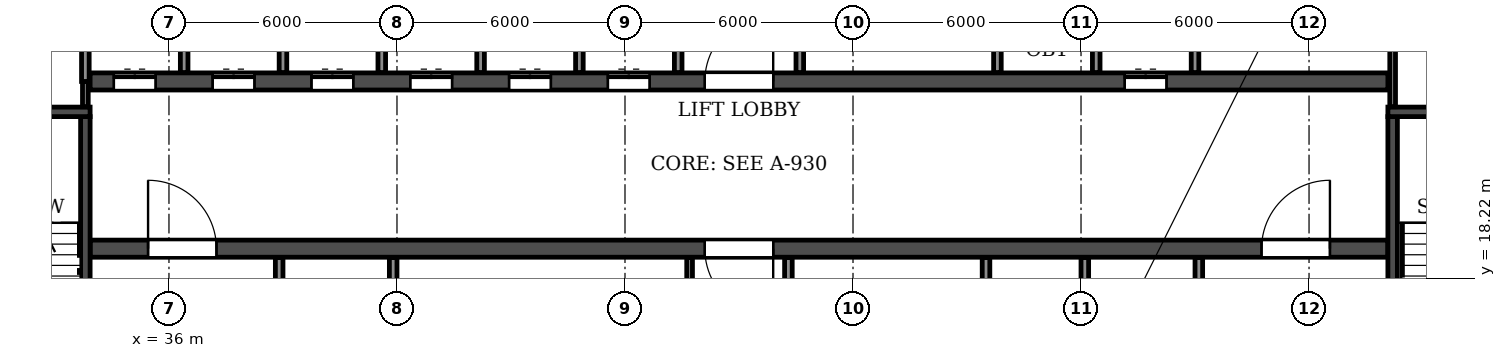
"""IFC4 building model, lengths in metres.
Left out: names, types, materials, properties, quantities, classifications, styles, units other than length and angle.
Written with IfcOpenShell. Run it as: python <this file> out.ifc"""

import sys

from ifc_helpers import new_model, si_unit, direction, frame, frame_2d, origin, place, context, subcontext, project, spatial, rectangle, extrude, element, fill, save


model = new_model("IFC4")
c1 = context("Model", 3, precision=1e-05, world=origin(), true_north=direction((0.0, 1.0)))
c2 = subcontext(c1, "Body", "Model", "MODEL_VIEW")
j1 = project(units=[si_unit("LENGTHUNIT", "METRE"), si_unit("PLANEANGLEUNIT", "RADIAN")], contexts=[c1])
p1 = place(None, origin())
s1 = spatial("IfcSite", under=j1, at=p1, CompositionType="ELEMENT")
p2 = place(p1, origin())
s2 = spatial("IfcBuilding", under=s1, at=p2, CompositionType="ELEMENT")
p3 = place(p2, frame((0.0, 0.0, 162.0)))
s3 = spatial("IfcBuildingStorey", under=s2, at=p3, CompositionType="ELEMENT", Elevation=162.0)
p4 = place(p3, frame((33.925, 19.0, 0.0), z_axis=(0.0, 0.0, 1.0), x_axis=(1.0, 0.0, 0.0)))
e1 = element("IfcWall", 1, at=p4, inside=s3, PredefinedType="SOLIDWALL", context=c2, shape_type="SweptSolid", body=[
    extrude(rectangle(XDim=34.15, YDim=0.45, at=frame_2d((17.075, 0.0))), origin(), (0.0, 0.0, 1.0), 2.95),
])
p5 = place(p4, frame((16.175, 0.0, 0.0)))
e2 = element("IfcOpeningElement", 2, at=p5, cuts=e1, PredefinedType="OPENING", context=c2, shape_type="SweptSolid", body=[
    extrude(rectangle(XDim=1.8, YDim=2.1, at=frame_2d((0.9, 1.05))), frame((0.0, 0.235, 0.0), z_axis=(0.0, -1.0, 0.0), x_axis=(1.0, 0.0, 0.0)), (0.0, 0.0, 1.0), 0.47),
])
p6 = place(p4, frame((1.525, 0.0, 0.0)))
e3 = element("IfcOpeningElement", 3, at=p6, cuts=e1, PredefinedType="OPENING", context=c2, shape_type="SweptSolid", body=[
    extrude(rectangle(XDim=1.8, YDim=2.1, at=frame_2d((0.9, 1.05))), frame((0.0, 0.235, 0.0), z_axis=(0.0, -1.0, 0.0), x_axis=(1.0, 0.0, 0.0)), (0.0, 0.0, 1.0), 0.47),
])
p7 = place(p4, frame((30.825, 0.0, 0.0)))
e4 = element("IfcOpeningElement", 4, at=p7, cuts=e1, PredefinedType="OPENING", context=c2, shape_type="SweptSolid", body=[
    extrude(rectangle(XDim=1.8, YDim=2.1, at=frame_2d((0.9, 1.05))), frame((0.0, 0.235, 0.0), z_axis=(0.0, -1.0, 0.0), x_axis=(1.0, 0.0, 0.0)), (0.0, 0.0, 1.0), 0.47),
])
p8 = place(p3, frame((33.925, 23.4, 0.0), z_axis=(0.0, 0.0, 1.0), x_axis=(1.0, 0.0, 0.0)))
e5 = element("IfcWall", 5, at=p8, inside=s3, PredefinedType="SOLIDWALL", context=c2, shape_type="SweptSolid", body=[
    extrude(rectangle(XDim=34.15, YDim=0.45, at=frame_2d((17.075, 0.0))), origin(), (0.0, 0.0, 1.0), 2.95),
])
p9 = place(p8, frame((16.175, 0.0, 0.0)))
e6 = element("IfcOpeningElement", 6, at=p9, cuts=e5, PredefinedType="OPENING", context=c2, shape_type="SweptSolid", body=[
    extrude(rectangle(XDim=1.8, YDim=2.1, at=frame_2d((0.9, 1.05))), frame((0.0, 0.235, 0.0), z_axis=(0.0, -1.0, 0.0), x_axis=(1.0, 0.0, 0.0)), (0.0, 0.0, 1.0), 0.47),
])
p10 = place(p8, frame((0.625, 0.0, 0.0)))
e7 = element("IfcOpeningElement", 7, at=p10, cuts=e5, PredefinedType="OPENING", context=c2, shape_type="SweptSolid", body=[
    extrude(rectangle(XDim=1.1, YDim=2.1, at=frame_2d((0.55, 1.05))), frame((0.0, 0.235, 0.0), z_axis=(0.0, -1.0, 0.0), x_axis=(1.0, 0.0, 0.0)), (0.0, 0.0, 1.0), 0.47),
])
p11 = place(p8, frame((3.225, 0.0, 0.0)))
e8 = element("IfcOpeningElement", 8, at=p11, cuts=e5, PredefinedType="OPENING", context=c2, shape_type="SweptSolid", body=[
    extrude(rectangle(XDim=1.1, YDim=2.1, at=frame_2d((0.55, 1.05))), frame((0.0, 0.235, 0.0), z_axis=(0.0, -1.0, 0.0), x_axis=(1.0, 0.0, 0.0)), (0.0, 0.0, 1.0), 0.47),
])
p12 = place(p8, frame((5.825, 0.0, 0.0)))
e9 = element("IfcOpeningElement", 9, at=p12, cuts=e5, PredefinedType="OPENING", context=c2, shape_type="SweptSolid", body=[
    extrude(rectangle(XDim=1.1, YDim=2.1, at=frame_2d((0.55, 1.05))), frame((0.0, 0.235, 0.0), z_axis=(0.0, -1.0, 0.0), x_axis=(1.0, 0.0, 0.0)), (0.0, 0.0, 1.0), 0.47),
])
p13 = place(p8, frame((8.425, 0.0, 0.0)))
e10 = element("IfcOpeningElement", 10, at=p13, cuts=e5, PredefinedType="OPENING", context=c2, shape_type="SweptSolid", body=[
    extrude(rectangle(XDim=1.1, YDim=2.1, at=frame_2d((0.55, 1.05))), frame((0.0, 0.235, 0.0), z_axis=(0.0, -1.0, 0.0), x_axis=(1.0, 0.0, 0.0)), (0.0, 0.0, 1.0), 0.47),
])
p14 = place(p8, frame((11.025, 0.0, 0.0)))
e11 = element("IfcOpeningElement", 11, at=p14, cuts=e5, PredefinedType="OPENING", context=c2, shape_type="SweptSolid", body=[
    extrude(rectangle(XDim=1.1, YDim=2.1, at=frame_2d((0.55, 1.05))), frame((0.0, 0.235, 0.0), z_axis=(0.0, -1.0, 0.0), x_axis=(1.0, 0.0, 0.0)), (0.0, 0.0, 1.0), 0.47),
])
p15 = place(p8, frame((13.625, 0.0, 0.0)))
e12 = element("IfcOpeningElement", 12, at=p15, cuts=e5, PredefinedType="OPENING", context=c2, shape_type="SweptSolid", body=[
    extrude(rectangle(XDim=1.1, YDim=2.1, at=frame_2d((0.55, 1.05))), frame((0.0, 0.235, 0.0), z_axis=(0.0, -1.0, 0.0), x_axis=(1.0, 0.0, 0.0)), (0.0, 0.0, 1.0), 0.47),
])
p16 = place(p8, frame((27.225, 0.0, 0.0)))
e13 = element("IfcOpeningElement", 13, at=p16, cuts=e5, PredefinedType="OPENING", context=c2, shape_type="SweptSolid", body=[
    extrude(rectangle(XDim=1.1, YDim=2.1, at=frame_2d((0.55, 1.05))), frame((0.0, 0.235, 0.0), z_axis=(0.0, -1.0, 0.0), x_axis=(1.0, 0.0, 0.0)), (0.0, 0.0, 1.0), 0.47),
])
p17 = place(p3, frame((33.8, 14.825, 0.0), z_axis=(0.0, 0.0, 1.0), x_axis=(0.0, 1.0, 0.0)))
e14 = element("IfcWall", 14, at=p17, inside=s3, PredefinedType="SOLIDWALL", context=c2, shape_type="SweptSolid", body=[
    extrude(rectangle(XDim=7.65, YDim=0.25, at=frame_2d((3.825, 0.0))), origin(), (0.0, 0.0, 1.0), 2.95),
])
p18 = place(p17, frame((0.475, 0.0, 0.0)))
e15 = element("IfcOpeningElement", 15, at=p18, cuts=e14, PredefinedType="OPENING", context=c2, shape_type="SweptSolid", body=[
    extrude(rectangle(XDim=1.0, YDim=2.1, at=frame_2d((0.5, 1.05))), frame((0.0, 0.135, 0.0), z_axis=(0.0, -1.0, 0.0), x_axis=(1.0, 0.0, 0.0)), (0.0, 0.0, 1.0), 0.27),
])
p19 = place(p3, frame((29.875, 22.6, 0.0), z_axis=(0.0, 0.0, 1.0), x_axis=(1.0, 0.0, 0.0)))
e16 = element("IfcWall", 16, at=p19, inside=s3, PredefinedType="SOLIDWALL", context=c2, shape_type="SweptSolid", body=[
    extrude(rectangle(XDim=4.05, YDim=0.25, at=frame_2d((2.025, 0.0))), origin(), (0.0, 0.0, 1.0), 2.95),
])
p20 = place(p3, frame((68.2, 14.825, 0.0), z_axis=(0.0, 0.0, 1.0), x_axis=(0.0, 1.0, 0.0)))
e17 = element("IfcWall", 17, at=p20, inside=s3, PredefinedType="SOLIDWALL", context=c2, shape_type="SweptSolid", body=[
    extrude(rectangle(XDim=7.65, YDim=0.25, at=frame_2d((3.825, 0.0))), origin(), (0.0, 0.0, 1.0), 2.95),
])
p21 = place(p20, frame((0.475, 0.0, 0.0)))
e18 = element("IfcOpeningElement", 18, at=p21, cuts=e17, PredefinedType="OPENING", context=c2, shape_type="SweptSolid", body=[
    extrude(rectangle(XDim=1.0, YDim=2.1, at=frame_2d((0.5, 1.05))), frame((0.0, 0.135, 0.0), z_axis=(0.0, -1.0, 0.0), x_axis=(1.0, 0.0, 0.0)), (0.0, 0.0, 1.0), 0.27),
])
p22 = place(p3, frame((68.075, 22.6, 0.0), z_axis=(0.0, 0.0, 1.0), x_axis=(1.0, 0.0, 0.0)))
e19 = element("IfcWall", 19, at=p22, inside=s3, PredefinedType="SOLIDWALL", context=c2, shape_type="SweptSolid", body=[
    extrude(rectangle(XDim=4.05, YDim=0.25, at=frame_2d((2.025, 0.0))), origin(), (0.0, 0.0, 1.0), 2.95),
])
p23 = place(p3, frame((49.7, 14.835, 0.0), z_axis=(0.0, 0.0, 1.0), x_axis=(0.0, 1.0, 0.0)))
e20 = element("IfcWall", 20, at=p23, inside=s3, PredefinedType="PARTITIONING", context=c2, shape_type="SweptSolid", body=[
    extrude(rectangle(XDim=3.93, YDim=0.15, at=frame_2d((1.965, 0.0))), origin(), (0.0, 0.0, 1.0), 2.95),
])
for number, where, z_axis, x_axis in (
    (21, (52.3, 14.835, 0.0), (0.0, 0.0, 1.0), (0.0, 1.0, 0.0)),
    (22, (52.6, 23.635, 0.0), (0.0, 0.0, 1.0), (0.0, 1.0, 0.0)),
    (23, (57.5, 14.835, 0.0), (0.0, 0.0, 1.0), (0.0, 1.0, 0.0)),
):
    element("IfcWall", number, at=place(p3, frame(where, z_axis=z_axis, x_axis=x_axis)), inside=s3, PredefinedType="PARTITIONING", context=c2, shape_type="SweptSolid", body=[
        extrude(rectangle(XDim=3.93, YDim=0.2, at=frame_2d((1.965, 0.0))), origin(), (0.0, 0.0, 1.0), 2.95),
    ])
p24 = place(p3, frame((33.8, 22.735, 0.0), z_axis=(0.0, 0.0, 1.0), x_axis=(0.0, 1.0, 0.0)))
e24 = element("IfcWall", 24, at=p24, inside=s3, PredefinedType="PARTITIONING", context=c2, shape_type="SweptSolid", body=[
    extrude(rectangle(XDim=0.665, YDim=0.15, at=frame_2d((0.333, 0.0))), origin(), (0.0, 0.0, 1.0), 2.95),
])
p25 = place(p3, frame((68.2, 22.735, 0.0), z_axis=(0.0, 0.0, 1.0), x_axis=(0.0, 1.0, 0.0)))
e25 = element("IfcWall", 25, at=p25, inside=s3, PredefinedType="PARTITIONING", context=c2, shape_type="SweptSolid", body=[
    extrude(rectangle(XDim=4.83, YDim=0.15, at=frame_2d((2.415, 0.0))), origin(), (0.0, 0.0, 1.0), 2.95),
])
p26 = place(p3, frame((33.8, 23.4, 0.0), z_axis=(0.0, 0.0, 1.0), x_axis=(0.0, 1.0, 0.0)))
e26 = element("IfcWall", 26, at=p26, inside=s3, PredefinedType="PARTITIONING", context=c2, shape_type="SweptSolid", body=[
    extrude(rectangle(XDim=2.7, YDim=0.2, at=frame_2d((1.35, 0.0))), origin(), (0.0, 0.0, 1.0), 2.95),
])
p27 = place(p3, frame((36.4, 23.635, 0.0), z_axis=(0.0, 0.0, 1.0), x_axis=(0.0, 1.0, 0.0)))
e27 = element("IfcWall", 27, at=p27, inside=s3, PredefinedType="PARTITIONING", context=c2, shape_type="SweptSolid", body=[
    extrude(rectangle(XDim=2.465, YDim=0.2, at=frame_2d((1.232, 0.0))), origin(), (0.0, 0.0, 1.0), 2.95),
])
p28 = place(p3, frame((38.9, 14.835, 0.0), z_axis=(0.0, 0.0, 1.0), x_axis=(0.0, 1.0, 0.0)))
e28 = element("IfcWall", 28, at=p28, inside=s3, PredefinedType="PARTITIONING", context=c2, shape_type="SweptSolid", body=[
    extrude(rectangle(XDim=3.93, YDim=0.2, at=frame_2d((1.965, 0.0))), origin(), (0.0, 0.0, 1.0), 2.95),
])
p29 = place(p28, frame((1.415, 0.0, 0.0)))
e29 = element("IfcOpeningElement", 29, at=p29, cuts=e28, PredefinedType="OPENING", context=c2, shape_type="SweptSolid", body=[
    extrude(rectangle(XDim=1.1, YDim=2.1, at=frame_2d((0.55, 1.05))), frame((0.0, 0.11, 0.0), z_axis=(0.0, -1.0, 0.0), x_axis=(1.0, 0.0, 0.0)), (0.0, 0.0, 1.0), 0.22),
])
for number, where, z_axis, x_axis in (
    (30, (39.0, 23.635, 0.0), (0.0, 0.0, 1.0), (0.0, 1.0, 0.0)),
    (31, (41.6, 23.635, 0.0), (0.0, 0.0, 1.0), (0.0, 1.0, 0.0)),
):
    element("IfcWall", number, at=place(p3, frame(where, z_axis=z_axis, x_axis=x_axis)), inside=s3, PredefinedType="PARTITIONING", context=c2, shape_type="SweptSolid", body=[
        extrude(rectangle(XDim=2.465, YDim=0.2, at=frame_2d((1.232, 0.0))), origin(), (0.0, 0.0, 1.0), 2.95),
    ])
for number, where, z_axis, x_axis in (
    (32, (41.9, 14.835, 0.0), (0.0, 0.0, 1.0), (0.0, 1.0, 0.0)),
    (33, (44.2, 23.635, 0.0), (0.0, 0.0, 1.0), (0.0, 1.0, 0.0)),
    (34, (46.8, 23.635, 0.0), (0.0, 0.0, 1.0), (0.0, 1.0, 0.0)),
):
    element("IfcWall", number, at=place(p3, frame(where, z_axis=z_axis, x_axis=x_axis)), inside=s3, PredefinedType="PARTITIONING", context=c2, shape_type="SweptSolid", body=[
        extrude(rectangle(XDim=3.93, YDim=0.2, at=frame_2d((1.965, 0.0))), origin(), (0.0, 0.0, 1.0), 2.95),
    ])
for number, where, z_axis, x_axis in (
    (35, (49.4, 23.635, 0.0), (0.0, 0.0, 1.0), (0.0, 1.0, 0.0)),
    (36, (57.8, 23.635, 0.0), (0.0, 0.0, 1.0), (0.0, 1.0, 0.0)),
):
    element("IfcWall", number, at=place(p3, frame(where, z_axis=z_axis, x_axis=x_axis)), inside=s3, PredefinedType="PARTITIONING", context=c2, shape_type="SweptSolid", body=[
        extrude(rectangle(XDim=2.465, YDim=0.2, at=frame_2d((1.232, 0.0))), origin(), (0.0, 0.0, 1.0), 2.95),
    ])
p30 = place(p3, frame((60.1, 14.835, 0.0), z_axis=(0.0, 0.0, 1.0), x_axis=(0.0, 1.0, 0.0)))
e37 = element("IfcWall", 37, at=p30, inside=s3, PredefinedType="PARTITIONING", context=c2, shape_type="SweptSolid", body=[
    extrude(rectangle(XDim=3.93, YDim=0.2, at=frame_2d((1.965, 0.0))), origin(), (0.0, 0.0, 1.0), 2.95),
])
for number, where, z_axis, x_axis in (
    (38, (60.4, 23.635, 0.0), (0.0, 0.0, 1.0), (0.0, 1.0, 0.0)),
    (39, (63.0, 23.635, 0.0), (0.0, 0.0, 1.0), (0.0, 1.0, 0.0)),
):
    element("IfcWall", number, at=place(p3, frame(where, z_axis=z_axis, x_axis=x_axis)), inside=s3, PredefinedType="PARTITIONING", context=c2, shape_type="SweptSolid", body=[
        extrude(rectangle(XDim=2.465, YDim=0.2, at=frame_2d((1.232, 0.0))), origin(), (0.0, 0.0, 1.0), 2.95),
    ])
p31 = place(p3, frame((63.1, 14.835, 0.0), z_axis=(0.0, 0.0, 1.0), x_axis=(0.0, 1.0, 0.0)))
e40 = element("IfcWall", 40, at=p31, inside=s3, PredefinedType="PARTITIONING", context=c2, shape_type="SweptSolid", body=[
    extrude(rectangle(XDim=3.93, YDim=0.2, at=frame_2d((1.965, 0.0))), origin(), (0.0, 0.0, 1.0), 2.95),
])
p32 = place(p31, frame((1.415, 0.0, 0.0)))
e41 = element("IfcOpeningElement", 41, at=p32, cuts=e40, PredefinedType="OPENING", context=c2, shape_type="SweptSolid", body=[
    extrude(rectangle(XDim=1.1, YDim=2.1, at=frame_2d((0.55, 1.05))), frame((0.0, 0.11, 0.0), z_axis=(0.0, -1.0, 0.0), x_axis=(1.0, 0.0, 0.0)), (0.0, 0.0, 1.0), 0.22),
])
p33 = place(p9, origin())
e42 = element("IfcDoor", 42, at=p33, inside=s3, OperationType="DOUBLE_DOOR_SINGLE_SWING", PredefinedType="DOOR", context=c2, shape_type="SweptSolid", body=[
    extrude(rectangle(XDim=1.8, YDim=2.1, at=frame_2d((0.9, 1.05))), frame((0.0, 0.025, 0.0), z_axis=(0.0, -1.0, 0.0), x_axis=(1.0, 0.0, 0.0)), (0.0, 0.0, 1.0), 0.05),
])
fill(e6, e42)
p34 = place(p5, frame((1.8, 0.0, 0.0), z_axis=(0.0, 0.0, 1.0), x_axis=(-1.0, 0.0, 0.0)))
e43 = element("IfcDoor", 43, at=p34, inside=s3, OperationType="DOUBLE_DOOR_SINGLE_SWING", PredefinedType="DOOR", context=c2, shape_type="SweptSolid", body=[
    extrude(rectangle(XDim=1.8, YDim=2.1, at=frame_2d((0.9, 1.05))), frame((0.0, 0.025, 0.0), z_axis=(0.0, -1.0, 0.0), x_axis=(1.0, 0.0, 0.0)), (0.0, 0.0, 1.0), 0.05),
])
fill(e2, e43)
p35 = place(p10, origin())
e44 = element("IfcDoor", 44, at=p35, inside=s3, OperationType="DOUBLE_DOOR_SLIDING", PredefinedType="DOOR", context=c2, shape_type="SweptSolid", body=[
    extrude(rectangle(XDim=1.1, YDim=2.1, at=frame_2d((0.55, 1.05))), frame((0.0, 0.025, 0.0), z_axis=(0.0, -1.0, 0.0), x_axis=(1.0, 0.0, 0.0)), (0.0, 0.0, 1.0), 0.05),
])
fill(e7, e44)
p36 = place(p6, origin())
e45 = element("IfcDoor", 45, at=p36, inside=s3, OperationType="DOUBLE_DOOR_SINGLE_SWING", PredefinedType="DOOR", context=c2, shape_type="SweptSolid", body=[
    extrude(rectangle(XDim=1.8, YDim=2.1, at=frame_2d((0.9, 1.05))), frame((0.0, 0.025, 0.0), z_axis=(0.0, -1.0, 0.0), x_axis=(1.0, 0.0, 0.0)), (0.0, 0.0, 1.0), 0.05),
])
fill(e3, e45)
p37 = place(p11, origin())
e46 = element("IfcDoor", 46, at=p37, inside=s3, OperationType="DOUBLE_DOOR_SLIDING", PredefinedType="DOOR", context=c2, shape_type="SweptSolid", body=[
    extrude(rectangle(XDim=1.1, YDim=2.1, at=frame_2d((0.55, 1.05))), frame((0.0, 0.025, 0.0), z_axis=(0.0, -1.0, 0.0), x_axis=(1.0, 0.0, 0.0)), (0.0, 0.0, 1.0), 0.05),
])
fill(e8, e46)
p38 = place(p12, origin())
e47 = element("IfcDoor", 47, at=p38, inside=s3, OperationType="DOUBLE_DOOR_SLIDING", PredefinedType="DOOR", context=c2, shape_type="SweptSolid", body=[
    extrude(rectangle(XDim=1.1, YDim=2.1, at=frame_2d((0.55, 1.05))), frame((0.0, 0.025, 0.0), z_axis=(0.0, -1.0, 0.0), x_axis=(1.0, 0.0, 0.0)), (0.0, 0.0, 1.0), 0.05),
])
fill(e9, e47)
p39 = place(p13, origin())
e48 = element("IfcDoor", 48, at=p39, inside=s3, OperationType="DOUBLE_DOOR_SLIDING", PredefinedType="DOOR", context=c2, shape_type="SweptSolid", body=[
    extrude(rectangle(XDim=1.1, YDim=2.1, at=frame_2d((0.55, 1.05))), frame((0.0, 0.025, 0.0), z_axis=(0.0, -1.0, 0.0), x_axis=(1.0, 0.0, 0.0)), (0.0, 0.0, 1.0), 0.05),
])
fill(e10, e48)
p40 = place(p14, origin())
e49 = element("IfcDoor", 49, at=p40, inside=s3, OperationType="DOUBLE_DOOR_SLIDING", PredefinedType="DOOR", context=c2, shape_type="SweptSolid", body=[
    extrude(rectangle(XDim=1.1, YDim=2.1, at=frame_2d((0.55, 1.05))), frame((0.0, 0.025, 0.0), z_axis=(0.0, -1.0, 0.0), x_axis=(1.0, 0.0, 0.0)), (0.0, 0.0, 1.0), 0.05),
])
fill(e11, e49)
p41 = place(p15, origin())
e50 = element("IfcDoor", 50, at=p41, inside=s3, OperationType="DOUBLE_DOOR_SLIDING", PredefinedType="DOOR", context=c2, shape_type="SweptSolid", body=[
    extrude(rectangle(XDim=1.1, YDim=2.1, at=frame_2d((0.55, 1.05))), frame((0.0, 0.025, 0.0), z_axis=(0.0, -1.0, 0.0), x_axis=(1.0, 0.0, 0.0)), (0.0, 0.0, 1.0), 0.05),
])
fill(e12, e50)
p42 = place(p16, origin())
e51 = element("IfcDoor", 51, at=p42, inside=s3, OperationType="DOUBLE_DOOR_SLIDING", PredefinedType="DOOR", context=c2, shape_type="SweptSolid", body=[
    extrude(rectangle(XDim=1.1, YDim=2.1, at=frame_2d((0.55, 1.05))), frame((0.0, 0.025, 0.0), z_axis=(0.0, -1.0, 0.0), x_axis=(1.0, 0.0, 0.0)), (0.0, 0.0, 1.0), 0.05),
])
fill(e13, e51)
p43 = place(p7, origin())
e52 = element("IfcDoor", 52, at=p43, inside=s3, OperationType="DOUBLE_DOOR_SINGLE_SWING", PredefinedType="DOOR", context=c2, shape_type="SweptSolid", body=[
    extrude(rectangle(XDim=1.8, YDim=2.1, at=frame_2d((0.9, 1.05))), frame((0.0, 0.025, 0.0), z_axis=(0.0, -1.0, 0.0), x_axis=(1.0, 0.0, 0.0)), (0.0, 0.0, 1.0), 0.05),
])
fill(e4, e52)
save(model, sys.argv[1])
